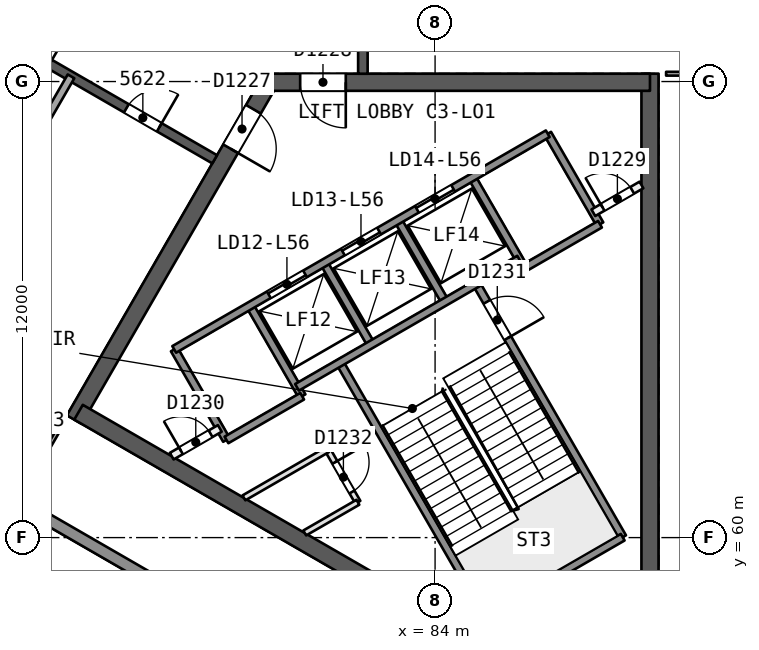
"""IFC4 building model, lengths in metres.
Left out: names, types, materials, properties, quantities, classifications, styles, units other than length and angle.
Written with IfcOpenShell. Run it as: python <this file> out.ifc"""

import sys

from ifc_helpers import new_model, si_unit, direction, frame, frame_2d, origin, place, context, subcontext, project, spatial, rectangle, extrude, element, fill, save


model = new_model("IFC4")
c1 = context("Model", 3, precision=1e-05, world=origin(), true_north=direction((0.0, 1.0)))
c2 = subcontext(c1, "Body", "Model", "MODEL_VIEW")
j1 = project(units=[si_unit("LENGTHUNIT", "METRE"), si_unit("PLANEANGLEUNIT", "RADIAN")], contexts=[c1])
p1 = place(None, origin())
s1 = spatial("IfcSite", under=j1, at=p1, CompositionType="ELEMENT")
p2 = place(p1, origin())
s2 = spatial("IfcBuilding", under=s1, at=p2, CompositionType="ELEMENT")
p3 = place(p2, frame((0.0, 0.0, 228.0)))
s3 = spatial("IfcBuildingStorey", under=s2, at=p3, CompositionType="ELEMENT", Elevation=228.0)
p4 = place(p3, frame((79.63, 71.981, 0.0), z_axis=(0.0, 0.0, 1.0), x_axis=(-0.500002171595, -0.86602415001, 0.0)))
e1 = element("IfcWall", 1, at=p4, inside=s3, PredefinedType="SHEAR", context=c2, shape_type="SweptSolid", body=[
    extrude(rectangle(XDim=10.25, YDim=0.45, at=frame_2d((5.125, 0.0))), origin(), (0.0, 0.0, 1.0), 3.7),
])
p5 = place(p4, frame((0.82, 0.0, 0.0)))
e2 = element("IfcOpeningElement", 2, at=p5, cuts=e1, PredefinedType="OPENING", context=c2, shape_type="SweptSolid", body=[
    extrude(rectangle(XDim=1.2, YDim=2.1, at=frame_2d((0.6, 1.05))), frame((0.0, 0.235, 0.0), z_axis=(0.0, -1.0, 0.0), x_axis=(1.0, 0.0, 0.0)), (0.0, 0.0, 1.0), 0.471),
])
p6 = place(p3, frame((74.617, 63.299, 0.0), z_axis=(0.0, 0.0, 1.0), x_axis=(0.86602594008, -0.499999071108, 0.0)))
e3 = element("IfcWall", 3, at=p6, inside=s3, PredefinedType="SHEAR", context=c2, shape_type="SweptSolid", body=[
    extrude(rectangle(XDim=14.108, YDim=0.45, at=frame_2d((7.054, 0.0))), origin(), (0.0, 0.0, 1.0), 3.7),
])
p7 = place(p3, frame((89.655, 58.002, 0.0), z_axis=(0.0, 0.0, 1.0), x_axis=(0.0, 1.0, 0.0)))
e4 = element("IfcWall", 4, at=p7, inside=s3, PredefinedType="SHEAR", context=c2, shape_type="SweptSolid", body=[
    extrude(rectangle(XDim=14.204, YDim=0.45, at=frame_2d((7.102, 0.0))), origin(), (0.0, 0.0, 1.0), 3.7),
])
p8 = place(p3, frame((89.655, 71.981, 0.0), z_axis=(0.0, 0.0, 1.0), x_axis=(-1.0, 0.0, 0.0)))
e5 = element("IfcWall", 5, at=p8, inside=s3, PredefinedType="SHEAR", context=c2, shape_type="SweptSolid", body=[
    extrude(rectangle(XDim=10.155, YDim=0.45, at=frame_2d((5.078, 0.0))), origin(), (0.0, 0.0, 1.0), 3.7),
])
p9 = place(p8, frame((8.005, 0.0, 0.0)))
e6 = element("IfcOpeningElement", 6, at=p9, cuts=e5, PredefinedType="OPENING", context=c2, shape_type="SweptSolid", body=[
    extrude(rectangle(XDim=1.2, YDim=2.1, at=frame_2d((0.6, 1.05))), frame((0.0, 0.235, 0.0), z_axis=(0.0, -1.0, 0.0), x_axis=(1.0, 0.0, 0.0)), (0.0, 0.0, 1.0), 0.471),
])
p10 = place(p3, frame((82.1, 72.206, 0.0), z_axis=(0.0, 0.0, 1.0), x_axis=(0.0, 1.0, 0.0)))
e7 = element("IfcWall", 7, at=p10, inside=s3, PredefinedType="SHEAR", context=c2, shape_type="SweptSolid", body=[
    extrude(rectangle(XDim=15.588, YDim=0.25, at=frame_2d((7.794, 0.0))), origin(), (0.0, 0.0, 1.0), 3.3),
])
p11 = place(p10, frame((2.15, 0.0, 0.0)))
e8 = element("IfcOpeningElement", 8, at=p11, cuts=e7, PredefinedType="OPENING", context=c2, shape_type="SweptSolid", body=[
    extrude(rectangle(XDim=1.0, YDim=2.1, at=frame_2d((0.5, 1.05))), frame((0.0, 0.135, 0.0), z_axis=(0.0, -1.0, 0.0), x_axis=(1.0, 0.0, 0.0)), (0.0, 0.0, 1.0), 0.271),
])
p12 = place(p10, frame((8.75, 0.0, 0.0)))
e9 = element("IfcOpeningElement", 9, at=p12, cuts=e7, PredefinedType="OPENING", context=c2, shape_type="SweptSolid", body=[
    extrude(rectangle(XDim=1.0, YDim=2.1, at=frame_2d((0.5, 1.05))), frame((0.0, 0.135, 0.0), z_axis=(0.0, -1.0, 0.0), x_axis=(1.0, 0.0, 0.0)), (0.0, 0.0, 1.0), 0.271),
])
p13 = place(p10, frame((12.594, 0.0, 0.0)))
e10 = element("IfcOpeningElement", 10, at=p13, cuts=e7, PredefinedType="OPENING", context=c2, shape_type="SweptSolid", body=[
    extrude(rectangle(XDim=1.0, YDim=2.1, at=frame_2d((0.5, 1.05))), frame((0.0, 0.135, 0.0), z_axis=(0.0, -1.0, 0.0), x_axis=(1.0, 0.0, 0.0)), (0.0, 0.0, 1.0), 0.271),
])
p14 = place(p3, frame((64.7, 77.748, 0.0), z_axis=(0.0, 0.0, 1.0), x_axis=(0.866026492143, -0.499998114903, 0.0)))
e11 = element("IfcWall", 11, at=p14, inside=s3, PredefinedType="SHEAR", context=c2, shape_type="SweptSolid", body=[
    extrude(rectangle(XDim=15.588, YDim=0.25, at=frame_2d((7.794, 0.0))), origin(), (0.0, 0.0, 1.0), 3.3),
])
p15 = place(p14, frame((2.462, 0.0, 0.0)))
e12 = element("IfcOpeningElement", 12, at=p15, cuts=e11, PredefinedType="OPENING", context=c2, shape_type="SweptSolid", body=[
    extrude(rectangle(XDim=1.0, YDim=2.1, at=frame_2d((0.5, 1.05))), frame((0.0, 0.135, 0.0), z_axis=(0.0, -1.0, 0.0), x_axis=(1.0, 0.0, 0.0)), (0.0, 0.0, 1.0), 0.271),
])
p16 = place(p14, frame((9.474, 0.0, 0.0)))
e13 = element("IfcOpeningElement", 13, at=p16, cuts=e11, PredefinedType="OPENING", context=c2, shape_type="SweptSolid", body=[
    extrude(rectangle(XDim=1.1, YDim=2.1, at=frame_2d((0.55, 1.05))), frame((0.0, 0.135, 0.0), z_axis=(0.0, -1.0, 0.0), x_axis=(1.0, 0.0, 0.0)), (0.0, 0.0, 1.0), 0.271),
])
p17 = place(p14, frame((12.906, 0.0, 0.0)))
e14 = element("IfcOpeningElement", 14, at=p17, cuts=e11, PredefinedType="OPENING", context=c2, shape_type="SweptSolid", body=[
    extrude(rectangle(XDim=1.0, YDim=2.1, at=frame_2d((0.5, 1.05))), frame((0.0, 0.135, 0.0), z_axis=(0.0, -1.0, 0.0), x_axis=(1.0, 0.0, 0.0)), (0.0, 0.0, 1.0), 0.271),
])
p18 = place(p3, frame((90.079, 72.206, 0.0), z_axis=(0.0, 0.0, 1.0), x_axis=(1.0, 0.0, 0.0)))
e15 = element("IfcWall", 15, at=p18, inside=s3, PredefinedType="PARTITIONING", context=c2, shape_type="SweptSolid", body=[
    extrude(rectangle(XDim=2.274, YDim=0.1, at=frame_2d((1.137, 0.0))), origin(), (0.0, 0.0, 1.0), 3.3),
])
p19 = place(p18, frame((0.687, 0.0, 0.0)))
e16 = element("IfcOpeningElement", 16, at=p19, cuts=e15, PredefinedType="OPENING", context=c2, shape_type="SweptSolid", body=[
    extrude(rectangle(XDim=0.9, YDim=2.1, at=frame_2d((0.45, 1.05))), frame((0.0, 0.061, 0.0), z_axis=(0.0, -1.0, 0.0), x_axis=(1.0, 0.0, 0.0)), (0.0, 0.0, 1.0), 0.121),
])
p20 = place(p3, frame((69.293, 63.257, 0.0), z_axis=(0.0, 0.0, 1.0), x_axis=(0.49999314277, 0.866029362772, 0.0)))
e17 = element("IfcWall", 17, at=p20, inside=s3, PredefinedType="PARTITIONING", context=c2, shape_type="SweptSolid", body=[
    extrude(rectangle(XDim=10.254, YDim=0.2, at=frame_2d((5.127, 0.0))), origin(), (0.0, 0.0, 1.0), 3.3),
])
p21 = place(p3, frame((73.073, 61.074, 0.0), z_axis=(0.0, 0.0, 1.0), x_axis=(0.499948534732, 0.866055115232, 0.0)))
e18 = element("IfcWall", 18, at=p21, inside=s3, PredefinedType="PARTITIONING", context=c2, shape_type="SweptSolid", body=[
    extrude(rectangle(XDim=2.275, YDim=0.1, at=frame_2d((1.137, 0.0))), origin(), (0.0, 0.0, 1.0), 3.3),
])
p22 = place(p21, frame((0.687, 0.0, 0.0)))
e19 = element("IfcOpeningElement", 19, at=p22, cuts=e18, PredefinedType="OPENING", context=c2, shape_type="SweptSolid", body=[
    extrude(rectangle(XDim=0.9, YDim=2.1, at=frame_2d((0.45, 1.05))), frame((0.0, 0.061, 0.0), z_axis=(0.0, -1.0, 0.0), x_axis=(1.0, 0.0, 0.0)), (0.0, 0.0, 1.0), 0.121),
])
p23 = place(p3, frame((88.043, 52.259, 0.0), z_axis=(0.0, 0.0, 1.0), x_axis=(-0.86602387423, 0.500002649256, 0.0)))
e20 = element("IfcWall", 20, at=p23, inside=s3, PredefinedType="SOLIDWALL", context=c2, shape_type="SweptSolid", body=[
    extrude(rectangle(XDim=50.333, YDim=0.3, at=frame_2d((25.167, 0.0))), origin(), (0.0, 0.0, 1.0), 3.3),
])
p24 = place(p23, frame((23.187, 0.0, 0.0)))
e21 = element("IfcOpeningElement", 21, at=p24, cuts=e20, PredefinedType="OPENING", context=c2, shape_type="SweptSolid", body=[
    extrude(rectangle(XDim=2.4, YDim=2.4, at=frame_2d((1.2, 1.2))), frame((0.0, 0.161, 0.0), z_axis=(0.0, -1.0, 0.0), x_axis=(1.0, 0.0, 0.0)), (0.0, 0.0, 1.0), 0.321),
])
p25 = place(p23, frame((28.799, 0.0, 0.0)))
e22 = element("IfcOpeningElement", 22, at=p25, cuts=e20, PredefinedType="OPENING", context=c2, shape_type="SweptSolid", body=[
    extrude(rectangle(XDim=2.4, YDim=2.4, at=frame_2d((1.2, 1.2))), frame((0.0, 0.161, 0.0), z_axis=(0.0, -1.0, 0.0), x_axis=(1.0, 0.0, 0.0)), (0.0, 0.0, 1.0), 0.321),
])
p26 = place(p23, frame((39.164, 0.0, 0.0)))
e23 = element("IfcOpeningElement", 23, at=p26, cuts=e20, PredefinedType="OPENING", context=c2, shape_type="SweptSolid", body=[
    extrude(rectangle(XDim=2.4, YDim=2.4, at=frame_2d((1.2, 1.2))), frame((0.0, 0.161, 0.0), z_axis=(0.0, -1.0, 0.0), x_axis=(1.0, 0.0, 0.0)), (0.0, 0.0, 1.0), 0.321),
])
p27 = place(p23, frame((18.354, 0.0, 0.0)))
e24 = element("IfcOpeningElement", 24, at=p27, cuts=e20, PredefinedType="OPENING", context=c2, shape_type="SweptSolid", body=[
    extrude(rectangle(XDim=2.4, YDim=2.4, at=frame_2d((1.2, 1.2))), frame((0.0, 0.161, 0.0), z_axis=(0.0, -1.0, 0.0), x_axis=(1.0, 0.0, 0.0)), (0.0, 0.0, 1.0), 0.321),
])
p28 = place(p23, frame((8.763, 0.0, 0.0)))
e25 = element("IfcOpeningElement", 25, at=p28, cuts=e20, PredefinedType="OPENING", context=c2, shape_type="SweptSolid", body=[
    extrude(rectangle(XDim=2.4, YDim=2.4, at=frame_2d((1.2, 1.2))), frame((0.0, 0.161, 0.0), z_axis=(0.0, -1.0, 0.0), x_axis=(1.0, 0.0, 0.0)), (0.0, 0.0, 1.0), 0.321),
])
p29 = place(p3, frame((77.135, 64.952, 0.0), z_axis=(0.0, 0.0, 1.0), x_axis=(0.499996545922, -0.866027397988, 0.0)))
e26 = element("IfcWall", 26, at=p29, inside=s3, PredefinedType="SOLIDWALL", context=c2, shape_type="SweptSolid", body=[
    extrude(rectangle(XDim=2.75, YDim=0.2, at=frame_2d((1.375, 0.0))), origin(), (0.0, 0.0, 1.0), 3.3),
])
p30 = place(p3, frame((81.169, 62.315, 0.0), z_axis=(0.0, 0.0, 1.0), x_axis=(0.499995408039, -0.866028054938, 0.0)))
e27 = element("IfcWall", 27, at=p30, inside=s3, PredefinedType="PARTITIONING", context=c2, shape_type="SweptSolid", body=[
    extrude(rectangle(XDim=1.6, YDim=0.15, at=frame_2d((0.8, 0.0))), origin(), (0.0, 0.0, 1.0), 3.3),
])
p31 = place(p30, frame((0.387, 0.0, 0.0)))
e28 = element("IfcOpeningElement", 28, at=p31, cuts=e27, PredefinedType="OPENING", context=c2, shape_type="SweptSolid", body=[
    extrude(rectangle(XDim=0.9, YDim=2.1, at=frame_2d((0.45, 1.05))), frame((0.0, 0.085, 0.0), z_axis=(0.0, -1.0, 0.0), x_axis=(1.0, 0.0, 0.0)), (0.0, 0.0, 1.0), 0.171),
])
p32 = place(p3, frame((79.127, 66.102, 0.0), z_axis=(0.0, 0.0, 1.0), x_axis=(0.499996545922, -0.866027397988, 0.0)))
e29 = element("IfcWall", 29, at=p32, inside=s3, PredefinedType="SOLIDWALL", context=c2, shape_type="SweptSolid", body=[
    extrude(rectangle(XDim=2.75, YDim=0.2, at=frame_2d((1.375, 0.0))), origin(), (0.0, 0.0, 1.0), 3.3),
])
p33 = place(p3, frame((81.493, 64.604, 0.0), z_axis=(0.0, 0.0, 1.0), x_axis=(0.500006057782, -0.866021906294, 0.0)))
e30 = element("IfcWall", 30, at=p33, inside=s3, PredefinedType="SOLIDWALL", context=c2, shape_type="SweptSolid", body=[
    extrude(rectangle(XDim=7.7, YDim=0.2, at=frame_2d((3.85, 0.0))), origin(), (0.0, 0.0, 1.0), 3.3),
])
for number, where, z_axis, x_axis in (
    (31, (81.076, 67.227, 0.0), (0.0, 0.0, 1.0), (0.5, -0.866, 0.0)),
    (32, (83.024, 68.352, 0.0), (0.0, 0.0, 1.0), (0.5, -0.866, 0.0)),
):
    element("IfcWall", number, at=place(p3, frame(where, z_axis=z_axis, x_axis=x_axis)), inside=s3, PredefinedType="SOLIDWALL", context=c2, shape_type="SweptSolid", body=[
        extrude(rectangle(XDim=2.48, YDim=0.2, at=frame_2d((1.24, 0.0))), origin(), (0.0, 0.0, 1.0), 3.3),
    ])
p34 = place(p3, frame((85.087, 66.679, 0.0), z_axis=(0.0, 0.0, 1.0), x_axis=(0.500019787375, -0.866013979237, 0.0)))
e33 = element("IfcWall", 33, at=p34, inside=s3, PredefinedType="SOLIDWALL", context=c2, shape_type="SweptSolid", body=[
    extrude(rectangle(XDim=7.7, YDim=0.2, at=frame_2d((3.85, 0.0))), origin(), (0.0, 0.0, 1.0), 3.3),
])
p35 = place(p34, frame((0.55, 0.0, 0.0)))
e34 = element("IfcOpeningElement", 34, at=p35, cuts=e33, PredefinedType="OPENING", context=c2, shape_type="SweptSolid", body=[
    extrude(rectangle(XDim=1.1, YDim=2.1, at=frame_2d((0.55, 1.05))), frame((0.0, 0.11, 0.0), z_axis=(0.0, -1.0, 0.0), x_axis=(1.0, 0.0, 0.0)), (0.0, 0.0, 1.0), 0.221),
])
for number, where, z_axis, x_axis in (
    (35, (84.973, 69.477, 0.0), (0.0, 0.0, 1.0), (0.5, -0.866, 0.0)),
    (36, (86.965, 70.626, 0.0), (0.0, 0.0, 1.0), (0.5, -0.866, 0.0)),
):
    element("IfcWall", number, at=place(p3, frame(where, z_axis=z_axis, x_axis=x_axis)), inside=s3, PredefinedType="SOLIDWALL", context=c2, shape_type="SweptSolid", body=[
        extrude(rectangle(XDim=2.75, YDim=0.2, at=frame_2d((1.375, 0.0))), origin(), (0.0, 0.0, 1.0), 3.3),
    ])
p36 = place(p3, frame((77.135, 64.952, 0.0), z_axis=(0.0, 0.0, 1.0), x_axis=(0.866031916153, 0.499988720078, 0.0)))
e37 = element("IfcWall", 37, at=p36, inside=s3, PredefinedType="SOLIDWALL", context=c2, shape_type="SweptSolid", body=[
    extrude(rectangle(XDim=11.35, YDim=0.2, at=frame_2d((5.675, 0.0))), origin(), (0.0, 0.0, 1.0), 3.3),
])
p37 = place(p36, frame((2.875, 0.0, 0.0)))
e38 = element("IfcOpeningElement", 38, at=p37, cuts=e37, PredefinedType="OPENING", context=c2, shape_type="SweptSolid", body=[
    extrude(rectangle(XDim=1.1, YDim=2.1, at=frame_2d((0.55, 1.05))), frame((0.0, 0.11, 0.0), z_axis=(0.0, -1.0, 0.0), x_axis=(1.0, 0.0, 0.0)), (0.0, 0.0, 1.0), 0.221),
])
p38 = place(p36, frame((5.125, 0.0, 0.0)))
e39 = element("IfcOpeningElement", 39, at=p38, cuts=e37, PredefinedType="OPENING", context=c2, shape_type="SweptSolid", body=[
    extrude(rectangle(XDim=1.1, YDim=2.1, at=frame_2d((0.55, 1.05))), frame((0.0, 0.11, 0.0), z_axis=(0.0, -1.0, 0.0), x_axis=(1.0, 0.0, 0.0)), (0.0, 0.0, 1.0), 0.221),
])
p39 = place(p36, frame((7.375, 0.0, 0.0)))
e40 = element("IfcOpeningElement", 40, at=p39, cuts=e37, PredefinedType="OPENING", context=c2, shape_type="SweptSolid", body=[
    extrude(rectangle(XDim=1.1, YDim=2.1, at=frame_2d((0.55, 1.05))), frame((0.0, 0.11, 0.0), z_axis=(0.0, -1.0, 0.0), x_axis=(1.0, 0.0, 0.0)), (0.0, 0.0, 1.0), 0.221),
])
p40 = place(p3, frame((77.07, 62.143, 0.0), z_axis=(0.0, 0.0, 1.0), x_axis=(0.866013036001, 0.500021421018, 0.0)))
e41 = element("IfcWall", 41, at=p40, inside=s3, PredefinedType="PARTITIONING", context=c2, shape_type="SweptSolid", body=[
    extrude(rectangle(XDim=1.461, YDim=0.2, at=frame_2d((0.73, 0.0))), origin(), (0.0, 0.0, 1.0), 3.3),
])
p41 = place(p40, frame((0.281, 0.0, 0.0)))
e42 = element("IfcOpeningElement", 42, at=p41, cuts=e41, PredefinedType="OPENING", context=c2, shape_type="SweptSolid", body=[
    extrude(rectangle(XDim=0.9, YDim=2.1, at=frame_2d((0.45, 1.05))), frame((0.0, 0.11, 0.0), z_axis=(0.0, -1.0, 0.0), x_axis=(1.0, 0.0, 0.0)), (0.0, 0.0, 1.0), 0.221),
])
p42 = place(p3, frame((88.165, 68.548, 0.0), z_axis=(0.0, 0.0, 1.0), x_axis=(0.866013036001, 0.500021421018, 0.0)))
e43 = element("IfcWall", 43, at=p42, inside=s3, PredefinedType="PARTITIONING", context=c2, shape_type="SweptSolid", body=[
    extrude(rectangle(XDim=1.461, YDim=0.2, at=frame_2d((0.73, 0.0))), origin(), (0.0, 0.0, 1.0), 3.3),
])
p43 = place(p42, frame((0.281, 0.0, 0.0)))
e44 = element("IfcOpeningElement", 44, at=p43, cuts=e43, PredefinedType="OPENING", context=c2, shape_type="SweptSolid", body=[
    extrude(rectangle(XDim=0.9, YDim=2.1, at=frame_2d((0.45, 1.05))), frame((0.0, 0.11, 0.0), z_axis=(0.0, -1.0, 0.0), x_axis=(1.0, 0.0, 0.0)), (0.0, 0.0, 1.0), 0.221),
])
p44 = place(p3, frame((80.367, 63.954, 0.0), z_axis=(0.0, 0.0, 1.0), x_axis=(0.866026575979, 0.499997969693, 0.0)))
e45 = element("IfcWall", 45, at=p44, inside=s3, PredefinedType="SOLIDWALL", context=c2, shape_type="SweptSolid", body=[
    extrude(rectangle(XDim=6.75, YDim=0.2, at=frame_2d((3.375, 0.0))), origin(), (0.0, 0.0, 1.0), 3.3),
])
p45 = place(p3, frame((78.51, 62.57, 0.0), z_axis=(0.0, 0.0, 1.0), x_axis=(0.866053019151, 0.499952165731, 0.0)))
e46 = element("IfcWall", 46, at=p45, inside=s3, PredefinedType="SOLIDWALL", context=c2, shape_type="SweptSolid", body=[
    extrude(rectangle(XDim=2.3, YDim=0.2, at=frame_2d((1.15, 0.0))), origin(), (0.0, 0.0, 1.0), 3.3),
])
p46 = place(p3, frame((86.348, 67.095, 0.0), z_axis=(0.0, 0.0, 1.0), x_axis=(0.86602648383, 0.499998129301, 0.0)))
e47 = element("IfcWall", 47, at=p46, inside=s3, PredefinedType="SOLIDWALL", context=c2, shape_type="SweptSolid", body=[
    extrude(rectangle(XDim=2.3, YDim=0.2, at=frame_2d((1.15, 0.0))), origin(), (0.0, 0.0, 1.0), 3.3),
])
p47 = place(p3, frame((78.97, 61.046, 0.0), z_axis=(0.0, 0.0, 1.0), x_axis=(0.866033475577, 0.499986018985, 0.0)))
e48 = element("IfcWall", 48, at=p47, inside=s3, PredefinedType="PARTITIONING", context=c2, shape_type="SweptSolid", body=[
    extrude(rectangle(XDim=2.539, YDim=0.15, at=frame_2d((1.27, 0.0))), origin(), (0.0, 0.0, 1.0), 3.3),
])
p48 = place(p3, frame((80.57, 60.122, 0.0), z_axis=(0.0, 0.0, 1.0), x_axis=(0.866039608017, 0.49997539674, 0.0)))
e49 = element("IfcWall", 49, at=p48, inside=s3, PredefinedType="PARTITIONING", context=c2, shape_type="SweptSolid", body=[
    extrude(rectangle(XDim=1.615, YDim=0.15, at=frame_2d((0.808, 0.0))), origin(), (0.0, 0.0, 1.0), 3.3),
])
p49 = place(p3, frame((85.343, 57.935, 0.0), z_axis=(0.0, 0.0, 1.0), x_axis=(0.866004344652, 0.500036473714, 0.0)))
e50 = element("IfcWall", 50, at=p49, inside=s3, PredefinedType="SOLIDWALL", context=c2, shape_type="SweptSolid", body=[
    extrude(rectangle(XDim=4.15, YDim=0.2, at=frame_2d((2.075, 0.0))), origin(), (0.0, 0.0, 1.0), 3.3),
])
p50 = place(p17, origin())
e51 = element("IfcDoor", 51, at=p50, inside=s3, OperationType="SINGLE_SWING_RIGHT", PredefinedType="NOTDEFINED", context=c2, shape_type="SweptSolid", body=[
    extrude(rectangle(XDim=1.0, YDim=2.1, at=frame_2d((0.5, 1.05))), frame((0.0, 0.025, 0.0), z_axis=(0.0, -1.0, 0.0), x_axis=(1.0, 0.0, 0.0)), (0.0, 0.0, 1.0), 0.05),
])
fill(e14, e51)
p51 = place(p5, origin())
e52 = element("IfcDoor", 52, at=p51, inside=s3, OperationType="SINGLE_SWING_RIGHT", PredefinedType="NOTDEFINED", context=c2, shape_type="SweptSolid", body=[
    extrude(rectangle(XDim=1.2, YDim=2.1, at=frame_2d((0.6, 1.05))), frame((0.0, 0.025, 0.0), z_axis=(0.0, -1.0, 0.0), x_axis=(1.0, 0.0, 0.0)), (0.0, 0.0, 1.0), 0.05),
])
fill(e2, e52)
p52 = place(p9, origin())
e53 = element("IfcDoor", 53, at=p52, inside=s3, OperationType="SINGLE_SWING_LEFT", PredefinedType="NOTDEFINED", context=c2, shape_type="SweptSolid", body=[
    extrude(rectangle(XDim=1.2, YDim=2.1, at=frame_2d((0.6, 1.05))), frame((0.0, 0.025, 0.0), z_axis=(0.0, -1.0, 0.0), x_axis=(1.0, 0.0, 0.0)), (0.0, 0.0, 1.0), 0.05),
])
fill(e6, e53)
p53 = place(p37, origin())
e54 = element("IfcDoor", 54, at=p53, inside=s3, OperationType="SLIDING_TO_LEFT", PredefinedType="NOTDEFINED", context=c2, shape_type="SweptSolid", body=[
    extrude(rectangle(XDim=1.1, YDim=2.1, at=frame_2d((0.55, 1.05))), frame((0.0, 0.025, 0.0), z_axis=(0.0, -1.0, 0.0), x_axis=(1.0, 0.0, 0.0)), (0.0, 0.0, 1.0), 0.05),
])
fill(e38, e54)
p54 = place(p38, origin())
e55 = element("IfcDoor", 55, at=p54, inside=s3, OperationType="SLIDING_TO_RIGHT", PredefinedType="NOTDEFINED", context=c2, shape_type="SweptSolid", body=[
    extrude(rectangle(XDim=1.1, YDim=2.1, at=frame_2d((0.55, 1.05))), frame((0.0, 0.025, 0.0), z_axis=(0.0, -1.0, 0.0), x_axis=(1.0, 0.0, 0.0)), (0.0, 0.0, 1.0), 0.05),
])
fill(e39, e55)
p55 = place(p39, origin())
e56 = element("IfcDoor", 56, at=p55, inside=s3, OperationType="SLIDING_TO_LEFT", PredefinedType="NOTDEFINED", context=c2, shape_type="SweptSolid", body=[
    extrude(rectangle(XDim=1.1, YDim=2.1, at=frame_2d((0.55, 1.05))), frame((0.0, 0.025, 0.0), z_axis=(0.0, -1.0, 0.0), x_axis=(1.0, 0.0, 0.0)), (0.0, 0.0, 1.0), 0.05),
])
fill(e40, e56)
p56 = place(p43, origin())
e57 = element("IfcDoor", 57, at=p56, inside=s3, OperationType="SINGLE_SWING_LEFT", PredefinedType="NOTDEFINED", context=c2, shape_type="SweptSolid", body=[
    extrude(rectangle(XDim=0.9, YDim=2.1, at=frame_2d((0.45, 1.05))), frame((0.0, 0.025, 0.0), z_axis=(0.0, -1.0, 0.0), x_axis=(1.0, 0.0, 0.0)), (0.0, 0.0, 1.0), 0.05),
])
fill(e44, e57)
p57 = place(p41, origin())
e58 = element("IfcDoor", 58, at=p57, inside=s3, OperationType="SINGLE_SWING_LEFT", PredefinedType="NOTDEFINED", context=c2, shape_type="SweptSolid", body=[
    extrude(rectangle(XDim=0.9, YDim=2.1, at=frame_2d((0.45, 1.05))), frame((0.0, 0.025, 0.0), z_axis=(0.0, -1.0, 0.0), x_axis=(1.0, 0.0, 0.0)), (0.0, 0.0, 1.0), 0.05),
])
fill(e42, e58)
p58 = place(p35, origin())
e59 = element("IfcDoor", 59, at=p58, inside=s3, OperationType="SINGLE_SWING_RIGHT", PredefinedType="NOTDEFINED", context=c2, shape_type="SweptSolid", body=[
    extrude(rectangle(XDim=1.1, YDim=2.1, at=frame_2d((0.55, 1.05))), frame((0.0, 0.025, 0.0), z_axis=(0.0, -1.0, 0.0), x_axis=(1.0, 0.0, 0.0)), (0.0, 0.0, 1.0), 0.05),
])
fill(e34, e59)
p59 = place(p31, origin())
e60 = element("IfcDoor", 60, at=p59, inside=s3, OperationType="SINGLE_SWING_LEFT", PredefinedType="NOTDEFINED", context=c2, shape_type="SweptSolid", body=[
    extrude(rectangle(XDim=0.9, YDim=2.1, at=frame_2d((0.45, 1.05))), frame((0.0, 0.025, 0.0), z_axis=(0.0, -1.0, 0.0), x_axis=(1.0, 0.0, 0.0)), (0.0, 0.0, 1.0), 0.05),
])
fill(e28, e60)
save(model, sys.argv[1])
